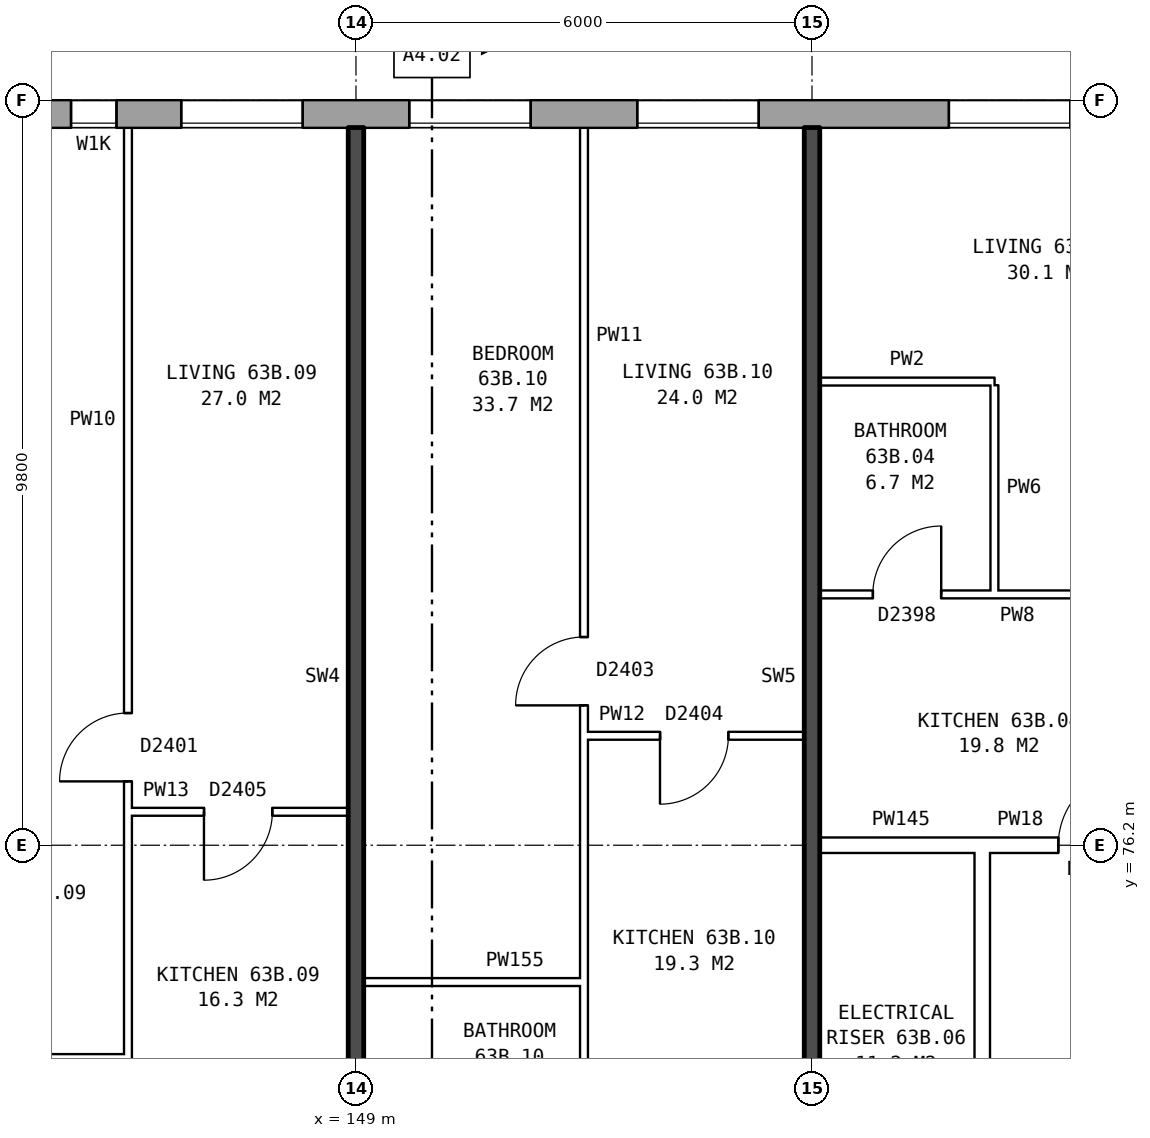
"""IFC4 building model, lengths in metres.
Left out: names, types, materials, properties, quantities, classifications, styles, units other than length and angle.
Written with IfcOpenShell. Run it as: python <this file> out.ifc"""

import sys

from ifc_helpers import new_model, si_unit, direction, frame, frame_2d, origin, place, context, subcontext, project, spatial, rectangle, extrude, element, fill, save


model = new_model("IFC4")
c1 = context("Model", 3, precision=1e-05, world=origin(), true_north=direction((0.0, 1.0)))
c2 = subcontext(c1, "Body", "Model", "MODEL_VIEW")
j1 = project(units=[si_unit("LENGTHUNIT", "METRE"), si_unit("PLANEANGLEUNIT", "RADIAN")], contexts=[c1])
p1 = place(None, origin())
s1 = spatial("IfcSite", under=j1, at=p1, CompositionType="ELEMENT")
p2 = place(p1, origin())
s2 = spatial("IfcBuilding", under=s1, at=p2, CompositionType="ELEMENT")
p3 = place(p2, frame((0.0, 0.0, 224.5)))
s3 = spatial("IfcBuildingStorey", under=s2, at=p3, CompositionType="ELEMENT", Elevation=224.5)
p4 = place(p3, frame((165.925, 85.82, 0.0), z_axis=(0.0, 0.0, 1.0), x_axis=(-1.0, 0.0, 0.0)))
e1 = element("IfcWall", 1, at=p4, inside=s3, PredefinedType="STANDARD", context=c2, shape_type="SweptSolid", body=[
    extrude(rectangle(XDim=33.875, YDim=0.36, at=frame_2d((16.938, 0.0))), origin(), (0.0, 0.0, 1.0), 2.85),
])
p5 = place(p4, frame((2.625, 0.0, 0.8)))
e2 = element("IfcOpeningElement", 2, at=p5, cuts=e1, PredefinedType="OPENING", context=c2, shape_type="SweptSolid", body=[
    extrude(rectangle(XDim=1.6, YDim=1.8, at=frame_2d((0.8, 0.9))), frame((0.0, 0.19, 0.0), z_axis=(0.0, -1.0, 0.0), x_axis=(1.0, 0.0, 0.0)), (0.0, 0.0, 1.0), 0.38),
])
p6 = place(p4, frame((5.625, 0.0, 0.8)))
e3 = element("IfcOpeningElement", 3, at=p6, cuts=e1, PredefinedType="OPENING", context=c2, shape_type="SweptSolid", body=[
    extrude(rectangle(XDim=1.6, YDim=1.8, at=frame_2d((0.8, 0.9))), frame((0.0, 0.19, 0.0), z_axis=(0.0, -1.0, 0.0), x_axis=(1.0, 0.0, 0.0)), (0.0, 0.0, 1.0), 0.38),
])
p7 = place(p4, frame((7.525, 0.0, 0.8)))
e4 = element("IfcOpeningElement", 4, at=p7, cuts=e1, PredefinedType="OPENING", context=c2, shape_type="SweptSolid", body=[
    extrude(rectangle(XDim=1.6, YDim=1.8, at=frame_2d((0.8, 0.9))), frame((0.0, 0.19, 0.0), z_axis=(0.0, -1.0, 0.0), x_axis=(1.0, 0.0, 0.0)), (0.0, 0.0, 1.0), 0.38),
])
p8 = place(p4, frame((11.625, 0.0, 0.8)))
e5 = element("IfcOpeningElement", 5, at=p8, cuts=e1, PredefinedType="OPENING", context=c2, shape_type="SweptSolid", body=[
    extrude(rectangle(XDim=1.6, YDim=1.8, at=frame_2d((0.8, 0.9))), frame((0.0, 0.19, 0.0), z_axis=(0.0, -1.0, 0.0), x_axis=(1.0, 0.0, 0.0)), (0.0, 0.0, 1.0), 0.38),
])
p9 = place(p4, frame((14.625, 0.0, 0.8)))
e6 = element("IfcOpeningElement", 6, at=p9, cuts=e1, PredefinedType="OPENING", context=c2, shape_type="SweptSolid", body=[
    extrude(rectangle(XDim=1.6, YDim=1.8, at=frame_2d((0.8, 0.9))), frame((0.0, 0.19, 0.0), z_axis=(0.0, -1.0, 0.0), x_axis=(1.0, 0.0, 0.0)), (0.0, 0.0, 1.0), 0.38),
])
p10 = place(p4, frame((17.625, 0.0, 0.8)))
e7 = element("IfcOpeningElement", 7, at=p10, cuts=e1, PredefinedType="OPENING", context=c2, shape_type="SweptSolid", body=[
    extrude(rectangle(XDim=1.6, YDim=1.8, at=frame_2d((0.8, 0.9))), frame((0.0, 0.19, 0.0), z_axis=(0.0, -1.0, 0.0), x_axis=(1.0, 0.0, 0.0)), (0.0, 0.0, 1.0), 0.38),
])
p11 = place(p4, frame((20.075, 0.0, 0.8)))
e8 = element("IfcOpeningElement", 8, at=p11, cuts=e1, PredefinedType="OPENING", context=c2, shape_type="SweptSolid", body=[
    extrude(rectangle(XDim=0.6, YDim=1.5, at=frame_2d((0.3, 0.75))), frame((0.0, 0.19, 0.0), z_axis=(0.0, -1.0, 0.0), x_axis=(1.0, 0.0, 0.0)), (0.0, 0.0, 1.0), 0.38),
])
p12 = place(p4, frame((23.625, 0.0, 0.8)))
e9 = element("IfcOpeningElement", 9, at=p12, cuts=e1, PredefinedType="OPENING", context=c2, shape_type="SweptSolid", body=[
    extrude(rectangle(XDim=1.6, YDim=1.8, at=frame_2d((0.8, 0.9))), frame((0.0, 0.19, 0.0), z_axis=(0.0, -1.0, 0.0), x_axis=(1.0, 0.0, 0.0)), (0.0, 0.0, 1.0), 0.38),
])
p13 = place(p4, frame((26.625, 0.0, 0.8)))
e10 = element("IfcOpeningElement", 10, at=p13, cuts=e1, PredefinedType="OPENING", context=c2, shape_type="SweptSolid", body=[
    extrude(rectangle(XDim=1.6, YDim=1.8, at=frame_2d((0.8, 0.9))), frame((0.0, 0.19, 0.0), z_axis=(0.0, -1.0, 0.0), x_axis=(1.0, 0.0, 0.0)), (0.0, 0.0, 1.0), 0.38),
])
p14 = place(p4, frame((29.625, 0.0, 0.8)))
e11 = element("IfcOpeningElement", 11, at=p14, cuts=e1, PredefinedType="OPENING", context=c2, shape_type="SweptSolid", body=[
    extrude(rectangle(XDim=1.6, YDim=1.8, at=frame_2d((0.8, 0.9))), frame((0.0, 0.19, 0.0), z_axis=(0.0, -1.0, 0.0), x_axis=(1.0, 0.0, 0.0)), (0.0, 0.0, 1.0), 0.38),
])
p15 = place(p4, frame((22.125, 0.0, 1.7)))
e12 = element("IfcOpeningElement", 12, at=p15, cuts=e1, PredefinedType="OPENING", context=c2, shape_type="SweptSolid", body=[
    extrude(rectangle(XDim=0.6, YDim=0.9, at=frame_2d((0.3, 0.45))), frame((0.0, 0.19, 0.0), z_axis=(0.0, -1.0, 0.0), x_axis=(1.0, 0.0, 0.0)), (0.0, 0.0, 1.0), 0.38),
])
p16 = place(p3, frame((157.24, 63.9, 0.0), z_axis=(0.0, 0.0, 1.0), x_axis=(0.0, 1.0, 0.0)))
e13 = element("IfcWall", 13, at=p16, inside=s3, PredefinedType="PARTITIONING", context=c2, shape_type="SweptSolid", body=[
    extrude(rectangle(XDim=12.2, YDim=0.2, at=frame_2d((6.1, 0.0))), origin(), (0.0, 0.0, 1.0), 2.85),
])
p17 = place(p16, frame((5.1, 0.0, 0.0)))
e14 = element("IfcOpeningElement", 14, at=p17, cuts=e13, PredefinedType="OPENING", context=c2, shape_type="SweptSolid", body=[
    extrude(rectangle(XDim=2.0, YDim=2.1, at=frame_2d((1.0, 1.05))), frame((0.0, 0.11, 0.0), z_axis=(0.0, -1.0, 0.0), x_axis=(1.0, 0.0, 0.0)), (0.0, 0.0, 1.0), 0.22),
])
p18 = place(p3, frame((142.76, 73.4, 0.0), z_axis=(0.0, 0.0, 1.0), x_axis=(1.0, 0.0, 0.0)))
e15 = element("IfcWall", 15, at=p18, inside=s3, PredefinedType="PARTITIONING", context=c2, shape_type="SweptSolid", body=[
    extrude(rectangle(XDim=3.24, YDim=0.1, at=frame_2d((1.62, 0.0))), origin(), (0.0, 0.0, 1.0), 2.85),
])
p19 = place(p3, frame((149.1, 74.4, 0.0), z_axis=(0.0, 0.0, 1.0), x_axis=(1.0, 0.0, 0.0)))
e16 = element("IfcWall", 16, at=p19, inside=s3, PredefinedType="PARTITIONING", context=c2, shape_type="SweptSolid", body=[
    extrude(rectangle(XDim=2.9, YDim=0.1, at=frame_2d((1.45, 0.0))), origin(), (0.0, 0.0, 1.0), 2.85),
])
p20 = place(p3, frame((155.1, 76.2, 0.0), z_axis=(0.0, 0.0, 1.0), x_axis=(1.0, 0.0, 0.0)))
e17 = element("IfcWall", 17, at=p20, inside=s3, PredefinedType="PARTITIONING", context=c2, shape_type="SweptSolid", body=[
    extrude(rectangle(XDim=2.14, YDim=0.2, at=frame_2d((1.07, 0.0))), origin(), (0.0, 0.0, 1.0), 2.85),
])
p21 = place(p3, frame((157.24, 76.2, 0.0), z_axis=(0.0, 0.0, 1.0), x_axis=(1.0, 0.0, 0.0)))
e18 = element("IfcWall", 18, at=p21, inside=s3, PredefinedType="PARTITIONING", context=c2, shape_type="SweptSolid", body=[
    extrude(rectangle(XDim=3.0, YDim=0.2, at=frame_2d((1.5, 0.0))), origin(), (0.0, 0.0, 1.0), 2.85),
])
p22 = place(p21, frame((1.0, 0.0, 0.0)))
e19 = element("IfcOpeningElement", 19, at=p22, cuts=e18, PredefinedType="OPENING", context=c2, shape_type="SweptSolid", body=[
    extrude(rectangle(XDim=1.0, YDim=2.1, at=frame_2d((0.5, 1.05))), frame((0.0, 0.11, 0.0), z_axis=(0.0, -1.0, 0.0), x_axis=(1.0, 0.0, 0.0)), (0.0, 0.0, 1.0), 0.22),
])
p23 = place(p3, frame((146.0, 76.64, 0.0), z_axis=(0.0, 0.0, 1.0), x_axis=(1.0, 0.0, 0.0)))
e20 = element("IfcWall", 20, at=p23, inside=s3, PredefinedType="PARTITIONING", context=c2, shape_type="SweptSolid", body=[
    extrude(rectangle(XDim=2.9, YDim=0.1, at=frame_2d((1.45, 0.0))), origin(), (0.0, 0.0, 1.0), 2.85),
])
p24 = place(p23, frame((1.0, 0.0, 0.0)))
e21 = element("IfcOpeningElement", 21, at=p24, cuts=e20, PredefinedType="OPENING", context=c2, shape_type="SweptSolid", body=[
    extrude(rectangle(XDim=0.9, YDim=2.1, at=frame_2d((0.45, 1.05))), frame((0.0, 0.06, 0.0), z_axis=(0.0, -1.0, 0.0), x_axis=(1.0, 0.0, 0.0)), (0.0, 0.0, 1.0), 0.12),
])
p25 = place(p3, frame((152.0, 77.64, 0.0), z_axis=(0.0, 0.0, 1.0), x_axis=(1.0, 0.0, 0.0)))
e22 = element("IfcWall", 22, at=p25, inside=s3, PredefinedType="PARTITIONING", context=c2, shape_type="SweptSolid", body=[
    extrude(rectangle(XDim=2.9, YDim=0.1, at=frame_2d((1.45, 0.0))), origin(), (0.0, 0.0, 1.0), 2.85),
])
p26 = place(p25, frame((1.0, 0.0, 0.0)))
e23 = element("IfcOpeningElement", 23, at=p26, cuts=e22, PredefinedType="OPENING", context=c2, shape_type="SweptSolid", body=[
    extrude(rectangle(XDim=0.9, YDim=2.1, at=frame_2d((0.45, 1.05))), frame((0.0, 0.06, 0.0), z_axis=(0.0, -1.0, 0.0), x_axis=(1.0, 0.0, 0.0)), (0.0, 0.0, 1.0), 0.12),
])
p27 = place(p3, frame((155.1, 79.5, 0.0), z_axis=(0.0, 0.0, 1.0), x_axis=(1.0, 0.0, 0.0)))
e24 = element("IfcWall", 24, at=p27, inside=s3, PredefinedType="PARTITIONING", context=c2, shape_type="SweptSolid", body=[
    extrude(rectangle(XDim=5.8, YDim=0.1, at=frame_2d((2.9, 0.0))), origin(), (0.0, 0.0, 1.0), 2.85),
])
p28 = place(p27, frame((3.6, 0.0, 0.0)))
e25 = element("IfcOpeningElement", 25, at=p28, cuts=e24, PredefinedType="OPENING", context=c2, shape_type="SweptSolid", body=[
    extrude(rectangle(XDim=0.9, YDim=2.1, at=frame_2d((0.45, 1.05))), frame((0.0, 0.06, 0.0), z_axis=(0.0, -1.0, 0.0), x_axis=(1.0, 0.0, 0.0)), (0.0, 0.0, 1.0), 0.12),
])
p29 = place(p27, frame((0.7, 0.0, 0.0)))
e26 = element("IfcOpeningElement", 26, at=p29, cuts=e24, PredefinedType="OPENING", context=c2, shape_type="SweptSolid", body=[
    extrude(rectangle(XDim=0.9, YDim=2.1, at=frame_2d((0.45, 1.05))), frame((0.0, 0.06, 0.0), z_axis=(0.0, -1.0, 0.0), x_axis=(1.0, 0.0, 0.0)), (0.0, 0.0, 1.0), 0.12),
])
p30 = place(p3, frame((155.1, 82.3, 0.0), z_axis=(0.0, 0.0, 1.0), x_axis=(1.0, 0.0, 0.0)))
e27 = element("IfcWall", 27, at=p30, inside=s3, PredefinedType="PARTITIONING", context=c2, shape_type="SweptSolid", body=[
    extrude(rectangle(XDim=2.3, YDim=0.1, at=frame_2d((1.15, 0.0))), origin(), (0.0, 0.0, 1.0), 2.85),
])
p31 = place(p3, frame((146.0, 71.3, 0.0), z_axis=(0.0, 0.0, 1.0), x_axis=(0.0, 1.0, 0.0)))
e28 = element("IfcWall", 28, at=p31, inside=s3, PredefinedType="PARTITIONING", context=c2, shape_type="SweptSolid", body=[
    extrude(rectangle(XDim=14.34, YDim=0.1, at=frame_2d((7.17, 0.0))), origin(), (0.0, 0.0, 1.0), 2.85),
])
p32 = place(p31, frame((5.74, 0.0, 0.0)))
e29 = element("IfcOpeningElement", 29, at=p32, cuts=e28, PredefinedType="OPENING", context=c2, shape_type="SweptSolid", body=[
    extrude(rectangle(XDim=0.9, YDim=2.1, at=frame_2d((0.45, 1.05))), frame((0.0, 0.06, 0.0), z_axis=(0.0, -1.0, 0.0), x_axis=(1.0, 0.0, 0.0)), (0.0, 0.0, 1.0), 0.12),
])
p33 = place(p31, frame((0.4, 0.0, 0.0)))
e30 = element("IfcOpeningElement", 30, at=p33, cuts=e28, PredefinedType="OPENING", context=c2, shape_type="SweptSolid", body=[
    extrude(rectangle(XDim=0.9, YDim=2.1, at=frame_2d((0.45, 1.05))), frame((0.0, 0.06, 0.0), z_axis=(0.0, -1.0, 0.0), x_axis=(1.0, 0.0, 0.0)), (0.0, 0.0, 1.0), 0.12),
])
p34 = place(p3, frame((149.0, 71.2, 0.0), z_axis=(0.0, 0.0, 1.0), x_axis=(0.0, 1.0, 0.0)))
e31 = element("IfcWall", 31, at=p34, inside=s3, PredefinedType="SOLIDWALL", context=c2, shape_type="SweptSolid", body=[
    extrude(rectangle(XDim=14.44, YDim=0.2, at=frame_2d((7.22, 0.0))), origin(), (0.0, 0.0, 1.0), 2.85),
])
p35 = place(p3, frame((152.0, 71.3, 0.0), z_axis=(0.0, 0.0, 1.0), x_axis=(0.0, 1.0, 0.0)))
e32 = element("IfcWall", 32, at=p35, inside=s3, PredefinedType="PARTITIONING", context=c2, shape_type="SweptSolid", body=[
    extrude(rectangle(XDim=14.34, YDim=0.1, at=frame_2d((7.17, 0.0))), origin(), (0.0, 0.0, 1.0), 2.85),
])
p36 = place(p35, frame((6.74, 0.0, 0.0)))
e33 = element("IfcOpeningElement", 33, at=p36, cuts=e32, PredefinedType="OPENING", context=c2, shape_type="SweptSolid", body=[
    extrude(rectangle(XDim=0.9, YDim=2.1, at=frame_2d((0.45, 1.05))), frame((0.0, 0.06, 0.0), z_axis=(0.0, -1.0, 0.0), x_axis=(1.0, 0.0, 0.0)), (0.0, 0.0, 1.0), 0.12),
])
p37 = place(p35, frame((0.4, 0.0, 0.0)))
e34 = element("IfcOpeningElement", 34, at=p37, cuts=e32, PredefinedType="OPENING", context=c2, shape_type="SweptSolid", body=[
    extrude(rectangle(XDim=0.9, YDim=2.1, at=frame_2d((0.45, 1.05))), frame((0.0, 0.06, 0.0), z_axis=(0.0, -1.0, 0.0), x_axis=(1.0, 0.0, 0.0)), (0.0, 0.0, 1.0), 0.12),
])
p38 = place(p3, frame((155.0, 71.2, 0.0), z_axis=(0.0, 0.0, 1.0), x_axis=(0.0, 1.0, 0.0)))
e35 = element("IfcWall", 35, at=p38, inside=s3, PredefinedType="SOLIDWALL", context=c2, shape_type="SweptSolid", body=[
    extrude(rectangle(XDim=14.44, YDim=0.2, at=frame_2d((7.22, 0.0))), origin(), (0.0, 0.0, 1.0), 2.85),
])
p39 = place(p3, frame((157.4, 79.55, 0.0), z_axis=(0.0, 0.0, 1.0), x_axis=(0.0, 1.0, 0.0)))
e36 = element("IfcWall", 36, at=p39, inside=s3, PredefinedType="PARTITIONING", context=c2, shape_type="SweptSolid", body=[
    extrude(rectangle(XDim=2.7, YDim=0.1, at=frame_2d((1.35, 0.0))), origin(), (0.0, 0.0, 1.0), 2.85),
])
p40 = place(p7, origin())
e37 = element("IfcWindow", 37, at=p40, inside=s3, PartitioningType="SINGLE_PANEL", PredefinedType="WINDOW", context=c2, shape_type="SweptSolid", body=[
    extrude(rectangle(XDim=1.6, YDim=1.8, at=frame_2d((0.8, 0.9))), frame((0.0, 0.15, 0.0), z_axis=(0.0, -1.0, 0.0), x_axis=(1.0, 0.0, 0.0)), (0.0, 0.0, 1.0), 0.06),
])
fill(e4, e37)
p41 = place(p8, origin())
e38 = element("IfcWindow", 38, at=p41, inside=s3, PartitioningType="SINGLE_PANEL", PredefinedType="WINDOW", context=c2, shape_type="SweptSolid", body=[
    extrude(rectangle(XDim=1.6, YDim=1.8, at=frame_2d((0.8, 0.9))), frame((0.0, 0.15, 0.0), z_axis=(0.0, -1.0, 0.0), x_axis=(1.0, 0.0, 0.0)), (0.0, 0.0, 1.0), 0.06),
])
fill(e5, e38)
p42 = place(p9, origin())
e39 = element("IfcWindow", 39, at=p42, inside=s3, PartitioningType="SINGLE_PANEL", PredefinedType="WINDOW", context=c2, shape_type="SweptSolid", body=[
    extrude(rectangle(XDim=1.6, YDim=1.8, at=frame_2d((0.8, 0.9))), frame((0.0, 0.15, 0.0), z_axis=(0.0, -1.0, 0.0), x_axis=(1.0, 0.0, 0.0)), (0.0, 0.0, 1.0), 0.06),
])
fill(e6, e39)
p43 = place(p10, origin())
e40 = element("IfcWindow", 40, at=p43, inside=s3, PartitioningType="SINGLE_PANEL", PredefinedType="WINDOW", context=c2, shape_type="SweptSolid", body=[
    extrude(rectangle(XDim=1.6, YDim=1.8, at=frame_2d((0.8, 0.9))), frame((0.0, 0.15, 0.0), z_axis=(0.0, -1.0, 0.0), x_axis=(1.0, 0.0, 0.0)), (0.0, 0.0, 1.0), 0.06),
])
fill(e7, e40)
p44 = place(p11, origin())
e41 = element("IfcWindow", 41, at=p44, inside=s3, PartitioningType="SINGLE_PANEL", PredefinedType="WINDOW", context=c2, shape_type="SweptSolid", body=[
    extrude(rectangle(XDim=0.6, YDim=1.5, at=frame_2d((0.3, 0.75))), frame((0.0, 0.15, 0.0), z_axis=(0.0, -1.0, 0.0), x_axis=(1.0, 0.0, 0.0)), (0.0, 0.0, 1.0), 0.06),
])
fill(e8, e41)
p45 = place(p22, origin())
e42 = element("IfcDoor", 42, at=p45, inside=s3, OperationType="SINGLE_SWING_RIGHT", PredefinedType="DOOR", context=c2, shape_type="SweptSolid", body=[
    extrude(rectangle(XDim=1.0, YDim=2.1, at=frame_2d((0.5, 1.05))), frame((0.0, 0.025, 0.0), z_axis=(0.0, -1.0, 0.0), x_axis=(1.0, 0.0, 0.0)), (0.0, 0.0, 1.0), 0.05),
])
fill(e19, e42)
p46 = place(p29, origin())
e43 = element("IfcDoor", 43, at=p46, inside=s3, OperationType="SINGLE_SWING_RIGHT", PredefinedType="DOOR", context=c2, shape_type="SweptSolid", body=[
    extrude(rectangle(XDim=0.9, YDim=2.1, at=frame_2d((0.45, 1.05))), frame((0.0, 0.025, 0.0), z_axis=(0.0, -1.0, 0.0), x_axis=(1.0, 0.0, 0.0)), (0.0, 0.0, 1.0), 0.05),
])
fill(e26, e43)
p47 = place(p32, origin())
e44 = element("IfcDoor", 44, at=p47, inside=s3, OperationType="SINGLE_SWING_LEFT", PredefinedType="DOOR", context=c2, shape_type="SweptSolid", body=[
    extrude(rectangle(XDim=0.9, YDim=2.1, at=frame_2d((0.45, 1.05))), frame((0.0, 0.025, 0.0), z_axis=(0.0, -1.0, 0.0), x_axis=(1.0, 0.0, 0.0)), (0.0, 0.0, 1.0), 0.05),
])
fill(e29, e44)
p48 = place(p24, frame((0.9, 0.0, 0.0), z_axis=(0.0, 0.0, 1.0), x_axis=(-1.0, 0.0, 0.0)))
e45 = element("IfcDoor", 45, at=p48, inside=s3, OperationType="SINGLE_SWING_RIGHT", PredefinedType="DOOR", context=c2, shape_type="SweptSolid", body=[
    extrude(rectangle(XDim=0.9, YDim=2.1, at=frame_2d((0.45, 1.05))), frame((0.0, 0.025, 0.0), z_axis=(0.0, -1.0, 0.0), x_axis=(1.0, 0.0, 0.0)), (0.0, 0.0, 1.0), 0.05),
])
fill(e21, e45)
p49 = place(p36, origin())
e46 = element("IfcDoor", 46, at=p49, inside=s3, OperationType="SINGLE_SWING_LEFT", PredefinedType="DOOR", context=c2, shape_type="SweptSolid", body=[
    extrude(rectangle(XDim=0.9, YDim=2.1, at=frame_2d((0.45, 1.05))), frame((0.0, 0.025, 0.0), z_axis=(0.0, -1.0, 0.0), x_axis=(1.0, 0.0, 0.0)), (0.0, 0.0, 1.0), 0.05),
])
fill(e33, e46)
p50 = place(p26, frame((0.9, 0.0, 0.0), z_axis=(0.0, 0.0, 1.0), x_axis=(-1.0, 0.0, 0.0)))
e47 = element("IfcDoor", 47, at=p50, inside=s3, OperationType="SINGLE_SWING_RIGHT", PredefinedType="DOOR", context=c2, shape_type="SweptSolid", body=[
    extrude(rectangle(XDim=0.9, YDim=2.1, at=frame_2d((0.45, 1.05))), frame((0.0, 0.025, 0.0), z_axis=(0.0, -1.0, 0.0), x_axis=(1.0, 0.0, 0.0)), (0.0, 0.0, 1.0), 0.05),
])
fill(e23, e47)
save(model, sys.argv[1])
